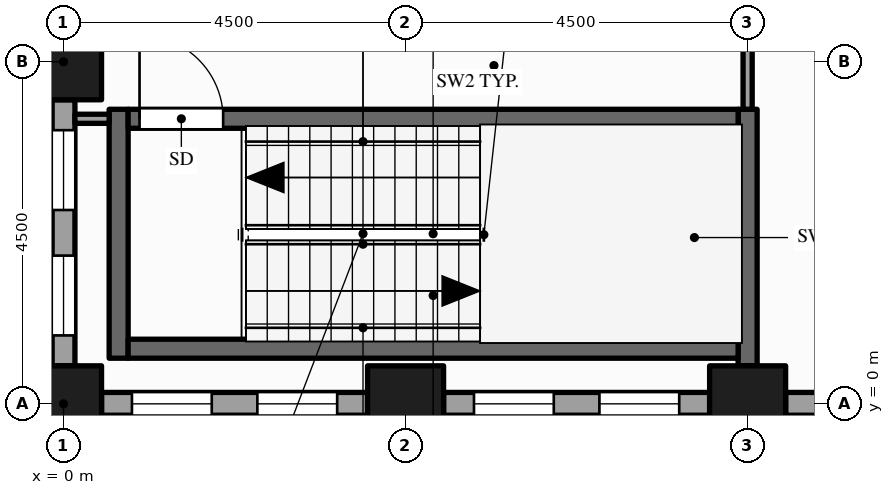
"""IFC4 building model, lengths in metres.
Left out: names, types, materials, properties, quantities, classifications, styles, units other than length and angle.
Written with IfcOpenShell. Run it as: python <this file> out.ifc"""

import sys

from ifc_helpers import new_model, si_unit, direction, frame, frame_2d, origin, origin_2d, place, context, subcontext, project, spatial, rectangle, hollow_rectangle, extrude, element, fill, save


model = new_model("IFC4")
c1 = context("Model", 3, precision=1e-05, world=origin(), true_north=direction((0.0, 1.0)))
c2 = subcontext(c1, "Body", "Model", "MODEL_VIEW")
j1 = project(units=[si_unit("LENGTHUNIT", "METRE"), si_unit("PLANEANGLEUNIT", "RADIAN")], contexts=[c1])
p1 = place(None, origin())
s1 = spatial("IfcSite", under=j1, at=p1, CompositionType="ELEMENT")
p2 = place(p1, origin())
s2 = spatial("IfcBuilding", under=s1, at=p2, CompositionType="ELEMENT")
p3 = place(p2, frame((0.0, 0.0, 83.0)))
s3 = spatial("IfcBuildingStorey", under=s2, at=p3, CompositionType="ELEMENT", Elevation=83.0)
for number, where, z_axis, x_axis in (
    (1, (0.0, 0.0, -0.15), (0.0, 0.0, 1.0), (1.0, 0.0, 0.0)),
    (2, (0.0, 4.5, -0.15), (0.0, 0.0, 1.0), (1.0, 0.0, 0.0)),
    (3, (4.5, 0.0, -0.15), (0.0, 0.0, 1.0), (1.0, 0.0, 0.0)),
    (4, (9.0, 0.0, -0.15), (0.0, 0.0, 1.0), (1.0, 0.0, 0.0)),
):
    element("IfcColumn", number, at=place(p3, frame(where, z_axis=z_axis, x_axis=x_axis)), inside=s3, PredefinedType="COLUMN", context=c2, shape_type="SweptSolid", body=[
        extrude(hollow_rectangle(XDim=1.0, YDim=1.0, WallThickness=0.05, at=origin_2d()), origin(), (0.0, 0.0, 1.0), 4.0),
    ])
p4 = place(p3, frame((0.0, 4.0, 0.0), z_axis=(0.0, 0.0, 1.0), x_axis=(0.0, -1.0, 0.0)))
e5 = element("IfcWall", 5, at=p4, inside=s3, PredefinedType="STANDARD", context=c2, shape_type="SweptSolid", body=[
    extrude(rectangle(XDim=3.5, YDim=0.3, at=frame_2d((1.75, 0.0))), origin(), (0.0, 0.0, 1.0), 3.154),
])
p5 = place(p4, frame((0.4, 0.0, 0.9)))
e6 = element("IfcOpeningElement", 6, at=p5, cuts=e5, PredefinedType="OPENING", context=c2, shape_type="SweptSolid", body=[
    extrude(rectangle(XDim=1.05, YDim=2.0, at=frame_2d((0.525, 1.0))), frame((0.0, 0.16, 0.0), z_axis=(0.0, -1.0, 0.0), x_axis=(1.0, 0.0, 0.0)), (0.0, 0.0, 1.0), 0.32),
])
p6 = place(p4, frame((2.05, 0.0, 0.9)))
e7 = element("IfcOpeningElement", 7, at=p6, cuts=e5, PredefinedType="OPENING", context=c2, shape_type="SweptSolid", body=[
    extrude(rectangle(XDim=1.05, YDim=2.0, at=frame_2d((0.525, 1.0))), frame((0.0, 0.16, 0.0), z_axis=(0.0, -1.0, 0.0), x_axis=(1.0, 0.0, 0.0)), (0.0, 0.0, 1.0), 0.32),
])
p7 = place(p3, frame((0.5, 0.0, 0.0), z_axis=(0.0, 0.0, 1.0), x_axis=(1.0, 0.0, 0.0)))
e8 = element("IfcWall", 8, at=p7, inside=s3, PredefinedType="STANDARD", context=c2, shape_type="SweptSolid", body=[
    extrude(rectangle(XDim=3.5, YDim=0.3, at=frame_2d((1.75, 0.0))), origin(), (0.0, 0.0, 1.0), 3.154),
])
p8 = place(p7, frame((0.4, 0.0, 0.9)))
e9 = element("IfcOpeningElement", 9, at=p8, cuts=e8, PredefinedType="OPENING", context=c2, shape_type="SweptSolid", body=[
    extrude(rectangle(XDim=1.05, YDim=2.0, at=frame_2d((0.525, 1.0))), frame((0.0, 0.16, 0.0), z_axis=(0.0, -1.0, 0.0), x_axis=(1.0, 0.0, 0.0)), (0.0, 0.0, 1.0), 0.32),
])
p9 = place(p7, frame((2.05, 0.0, 0.9)))
e10 = element("IfcOpeningElement", 10, at=p9, cuts=e8, PredefinedType="OPENING", context=c2, shape_type="SweptSolid", body=[
    extrude(rectangle(XDim=1.05, YDim=2.0, at=frame_2d((0.525, 1.0))), frame((0.0, 0.16, 0.0), z_axis=(0.0, -1.0, 0.0), x_axis=(1.0, 0.0, 0.0)), (0.0, 0.0, 1.0), 0.32),
])
p10 = place(p3, frame((5.0, 0.0, 0.0), z_axis=(0.0, 0.0, 1.0), x_axis=(1.0, 0.0, 0.0)))
e11 = element("IfcWall", 11, at=p10, inside=s3, PredefinedType="STANDARD", context=c2, shape_type="SweptSolid", body=[
    extrude(rectangle(XDim=3.5, YDim=0.3, at=frame_2d((1.75, 0.0))), origin(), (0.0, 0.0, 1.0), 3.154),
])
p11 = place(p10, frame((0.4, 0.0, 0.9)))
e12 = element("IfcOpeningElement", 12, at=p11, cuts=e11, PredefinedType="OPENING", context=c2, shape_type="SweptSolid", body=[
    extrude(rectangle(XDim=1.05, YDim=2.0, at=frame_2d((0.525, 1.0))), frame((0.0, 0.16, 0.0), z_axis=(0.0, -1.0, 0.0), x_axis=(1.0, 0.0, 0.0)), (0.0, 0.0, 1.0), 0.32),
])
p12 = place(p10, frame((2.05, 0.0, 0.9)))
e13 = element("IfcOpeningElement", 13, at=p12, cuts=e11, PredefinedType="OPENING", context=c2, shape_type="SweptSolid", body=[
    extrude(rectangle(XDim=1.05, YDim=2.0, at=frame_2d((0.525, 1.0))), frame((0.0, 0.16, 0.0), z_axis=(0.0, -1.0, 0.0), x_axis=(1.0, 0.0, 0.0)), (0.0, 0.0, 1.0), 0.32),
])
p13 = place(p3, frame((9.5, 0.0, 0.0), z_axis=(0.0, 0.0, 1.0), x_axis=(1.0, 0.0, 0.0)))
e14 = element("IfcWall", 14, at=p13, inside=s3, PredefinedType="STANDARD", context=c2, shape_type="SweptSolid", body=[
    extrude(rectangle(XDim=3.5, YDim=0.3, at=frame_2d((1.75, 0.0))), origin(), (0.0, 0.0, 1.0), 3.154),
])
p14 = place(p13, frame((0.4, 0.0, 0.9)))
e15 = element("IfcOpeningElement", 15, at=p14, cuts=e14, PredefinedType="OPENING", context=c2, shape_type="SweptSolid", body=[
    extrude(rectangle(XDim=1.05, YDim=2.0, at=frame_2d((0.525, 1.0))), frame((0.0, 0.16, 0.0), z_axis=(0.0, -1.0, 0.0), x_axis=(1.0, 0.0, 0.0)), (0.0, 0.0, 1.0), 0.32),
])
p15 = place(p13, frame((2.05, 0.0, 0.9)))
e16 = element("IfcOpeningElement", 16, at=p15, cuts=e14, PredefinedType="OPENING", context=c2, shape_type="SweptSolid", body=[
    extrude(rectangle(XDim=1.05, YDim=2.0, at=frame_2d((0.525, 1.0))), frame((0.0, 0.16, 0.0), z_axis=(0.0, -1.0, 0.0), x_axis=(1.0, 0.0, 0.0)), (0.0, 0.0, 1.0), 0.32),
])
p16 = place(p3, frame((0.725, 0.6, 0.0), z_axis=(0.0, 0.0, 1.0), x_axis=(0.0, 1.0, 0.0)))
e17 = element("IfcWall", 17, at=p16, inside=s3, PredefinedType="SHEAR", context=c2, shape_type="SweptSolid", body=[
    extrude(rectangle(XDim=3.275, YDim=0.25, at=frame_2d((1.637, 0.0))), origin(), (0.0, 0.0, 1.0), 3.85),
])
p17 = place(p3, frame((9.0, 0.15, 0.0), z_axis=(0.0, 0.0, 1.0), x_axis=(0.0, 1.0, 0.0)))
e18 = element("IfcWall", 18, at=p17, inside=s3, PredefinedType="PARTITIONING", context=c2, shape_type="SweptSolid", body=[
    extrude(rectangle(XDim=0.35, YDim=0.12, at=frame_2d((0.175, 0.0))), origin(), (0.0, 0.0, 1.0), 3.85),
])
p18 = place(p3, frame((9.0, 0.5, 0.0), z_axis=(0.0, 0.0, 1.0), x_axis=(0.0, 1.0, 0.0)))
e19 = element("IfcWall", 19, at=p18, inside=s3, PredefinedType="SHEAR", context=c2, shape_type="SweptSolid", body=[
    extrude(rectangle(XDim=3.375, YDim=0.25, at=frame_2d((1.688, 0.0))), origin(), (0.0, 0.0, 1.0), 3.85),
])
p19 = place(p3, frame((9.0, 3.875, 0.0), z_axis=(0.0, 0.0, 1.0), x_axis=(0.0, 1.0, 0.0)))
e20 = element("IfcWall", 20, at=p19, inside=s3, PredefinedType="PARTITIONING", context=c2, shape_type="SweptSolid", body=[
    extrude(rectangle(XDim=7.675, YDim=0.12, at=frame_2d((3.837, 0.0))), origin(), (0.0, 0.0, 1.0), 2.938),
])
p20 = place(p3, frame((0.85, 0.725, 0.0), z_axis=(0.0, 0.0, 1.0), x_axis=(1.0, 0.0, 0.0)))
e21 = element("IfcWall", 21, at=p20, inside=s3, PredefinedType="SHEAR", context=c2, shape_type="SweptSolid", body=[
    extrude(rectangle(XDim=8.025, YDim=0.25, at=frame_2d((4.012, 0.0))), origin(), (0.0, 0.0, 1.0), 3.85),
])
p21 = place(p3, frame((0.15, 3.75, 0.0), z_axis=(0.0, 0.0, 1.0), x_axis=(1.0, 0.0, 0.0)))
e22 = element("IfcWall", 22, at=p21, inside=s3, PredefinedType="PARTITIONING", context=c2, shape_type="SweptSolid", body=[
    extrude(rectangle(XDim=0.45, YDim=0.12, at=frame_2d((0.225, 0.0))), origin(), (0.0, 0.0, 1.0), 3.154),
])
p22 = place(p3, frame((0.85, 3.75, 0.0), z_axis=(0.0, 0.0, 1.0), x_axis=(1.0, 0.0, 0.0)))
e23 = element("IfcWall", 23, at=p22, inside=s3, PredefinedType="SHEAR", context=c2, shape_type="SweptSolid", body=[
    extrude(rectangle(XDim=8.025, YDim=0.25, at=frame_2d((4.012, 0.0))), origin(), (0.0, 0.0, 1.0), 3.85),
])
p23 = place(p22, frame((0.15, 0.0, 0.0)))
e24 = element("IfcOpeningElement", 24, at=p23, cuts=e23, PredefinedType="OPENING", context=c2, shape_type="SweptSolid", body=[
    extrude(rectangle(XDim=1.1, YDim=2.1, at=frame_2d((0.55, 1.05))), frame((0.0, 0.135, 0.0), z_axis=(0.0, -1.0, 0.0), x_axis=(1.0, 0.0, 0.0)), (0.0, 0.0, 1.0), 0.27),
])
p24 = place(p5, origin())
e25 = element("IfcWindow", 25, at=p24, inside=s3, PartitioningType="SINGLE_PANEL", PredefinedType="WINDOW", context=c2, shape_type="SweptSolid", body=[
    extrude(rectangle(XDim=1.05, YDim=2.0, at=frame_2d((0.525, 1.0))), frame((0.0, 0.03, 0.0), z_axis=(0.0, -1.0, 0.0), x_axis=(1.0, 0.0, 0.0)), (0.0, 0.0, 1.0), 0.06),
])
fill(e6, e25)
p25 = place(p6, origin())
e26 = element("IfcWindow", 26, at=p25, inside=s3, PartitioningType="SINGLE_PANEL", PredefinedType="WINDOW", context=c2, shape_type="SweptSolid", body=[
    extrude(rectangle(XDim=1.05, YDim=2.0, at=frame_2d((0.525, 1.0))), frame((0.0, 0.03, 0.0), z_axis=(0.0, -1.0, 0.0), x_axis=(1.0, 0.0, 0.0)), (0.0, 0.0, 1.0), 0.06),
])
fill(e7, e26)
p26 = place(p8, origin())
e27 = element("IfcWindow", 27, at=p26, inside=s3, PartitioningType="SINGLE_PANEL", PredefinedType="WINDOW", context=c2, shape_type="SweptSolid", body=[
    extrude(rectangle(XDim=1.05, YDim=2.0, at=frame_2d((0.525, 1.0))), frame((0.0, 0.03, 0.0), z_axis=(0.0, -1.0, 0.0), x_axis=(1.0, 0.0, 0.0)), (0.0, 0.0, 1.0), 0.06),
])
fill(e9, e27)
p27 = place(p9, origin())
e28 = element("IfcWindow", 28, at=p27, inside=s3, PartitioningType="SINGLE_PANEL", PredefinedType="WINDOW", context=c2, shape_type="SweptSolid", body=[
    extrude(rectangle(XDim=1.05, YDim=2.0, at=frame_2d((0.525, 1.0))), frame((0.0, 0.03, 0.0), z_axis=(0.0, -1.0, 0.0), x_axis=(1.0, 0.0, 0.0)), (0.0, 0.0, 1.0), 0.06),
])
fill(e10, e28)
p28 = place(p11, origin())
e29 = element("IfcWindow", 29, at=p28, inside=s3, PartitioningType="SINGLE_PANEL", PredefinedType="WINDOW", context=c2, shape_type="SweptSolid", body=[
    extrude(rectangle(XDim=1.05, YDim=2.0, at=frame_2d((0.525, 1.0))), frame((0.0, 0.03, 0.0), z_axis=(0.0, -1.0, 0.0), x_axis=(1.0, 0.0, 0.0)), (0.0, 0.0, 1.0), 0.06),
])
fill(e12, e29)
p29 = place(p12, origin())
e30 = element("IfcWindow", 30, at=p29, inside=s3, PartitioningType="SINGLE_PANEL", PredefinedType="WINDOW", context=c2, shape_type="SweptSolid", body=[
    extrude(rectangle(XDim=1.05, YDim=2.0, at=frame_2d((0.525, 1.0))), frame((0.0, 0.03, 0.0), z_axis=(0.0, -1.0, 0.0), x_axis=(1.0, 0.0, 0.0)), (0.0, 0.0, 1.0), 0.06),
])
fill(e13, e30)
p30 = place(p23, origin())
e31 = element("IfcDoor", 31, at=p30, inside=s3, OperationType="SINGLE_SWING_LEFT", PredefinedType="DOOR", context=c2, shape_type="SweptSolid", body=[
    extrude(rectangle(XDim=1.1, YDim=2.1, at=frame_2d((0.55, 1.05))), frame((0.0, 0.025, 0.0), z_axis=(0.0, -1.0, 0.0), x_axis=(1.0, 0.0, 0.0)), (0.0, 0.0, 1.0), 0.05),
])
fill(e24, e31)
save(model, sys.argv[1])
